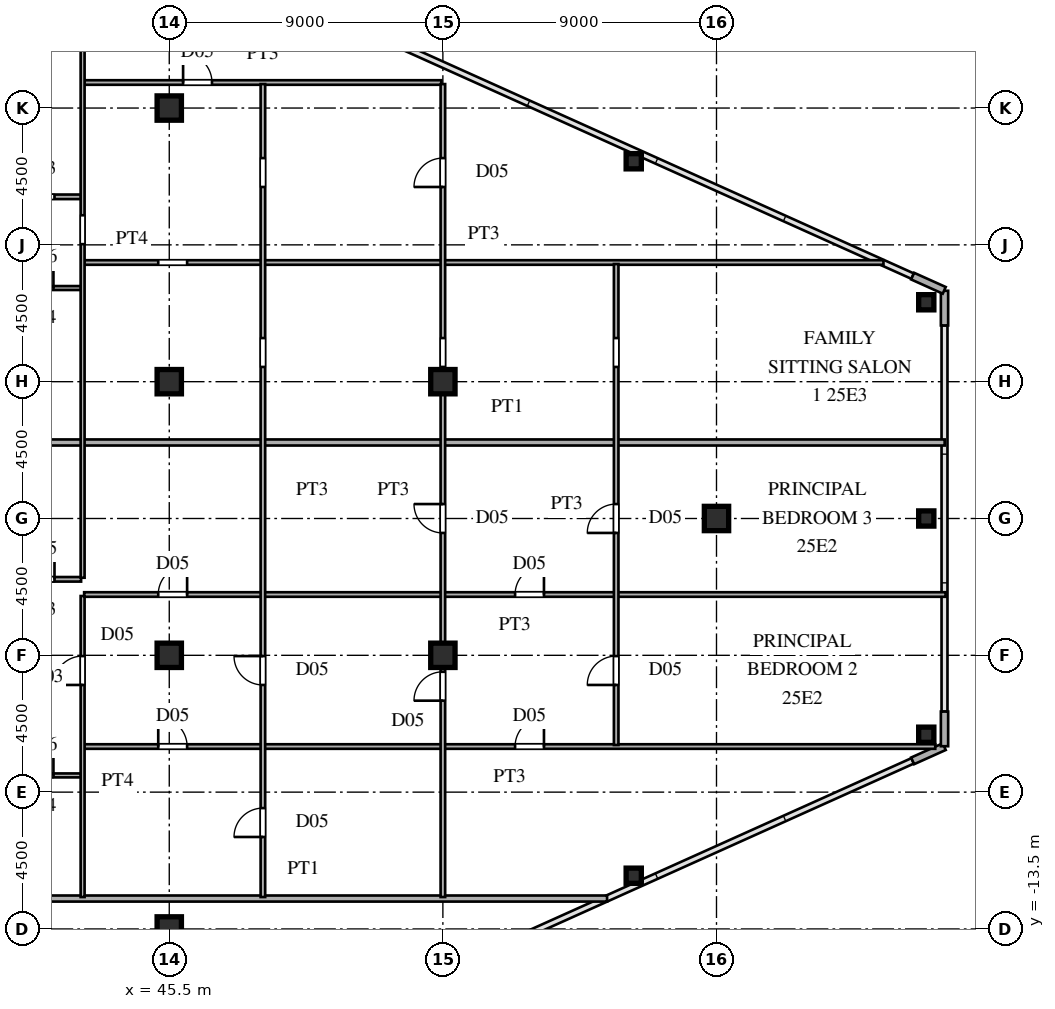
"""IFC4 building model, lengths in metres.
Left out: names, types, materials, properties, quantities, classifications, styles, units other than length and angle.
Written with IfcOpenShell. Run it as: python <this file> out.ifc"""

import sys

from ifc_helpers import new_model, si_unit, direction, frame, frame_2d, origin, origin_2d, place, context, subcontext, project, spatial, rectangle, hollow_rectangle, i_section, extrude, source, transform, mapped, element, fill, save


model = new_model("IFC4")
c1 = context("Model", 3, precision=1e-05, world=origin(), true_north=direction((0.0, 1.0)))
c2 = subcontext(c1, "Body", "Model", "MODEL_VIEW")
j1 = project(units=[si_unit("LENGTHUNIT", "METRE"), si_unit("PLANEANGLEUNIT", "RADIAN")], contexts=[c1])
p1 = place(None, origin())
s1 = spatial("IfcSite", under=j1, at=p1, CompositionType="ELEMENT")
p2 = place(p1, origin())
s2 = spatial("IfcBuilding", under=s1, at=p2, CompositionType="ELEMENT")
p3 = place(p2, frame((0.0, 0.0, 96.0)))
s3 = spatial("IfcBuildingStorey", under=s2, at=p3, CompositionType="ELEMENT", Elevation=96.0)
m1 = source(origin(), c2, "Body", "SweptSolid", [
    extrude(i_section(OverallWidth=0.8, OverallDepth=0.8, WebThickness=0.032, FlangeThickness=0.05, at=origin_2d()), origin(), (0.0, 0.0, 1.0), 3.6),
])
for number, where, z_axis, x_axis in (
    (1, (45.5, -13.5, 0.0), (0.0, 0.0, 1.0), (1.0, 0.0, 0.0)),
    (2, (45.5, -4.5, 0.0), (0.0, 0.0, 1.0), (1.0, 0.0, 0.0)),
    (3, (45.5, 4.5, 0.0), (0.0, 0.0, 1.0), (1.0, 0.0, 0.0)),
    (4, (45.5, 13.5, 0.0), (0.0, 0.0, 1.0), (1.0, 0.0, 0.0)),
    (5, (54.5, -4.5, 0.0), (0.0, 0.0, 1.0), (1.0, 0.0, 0.0)),
    (6, (54.5, 4.5, 0.0), (0.0, 0.0, 1.0), (1.0, 0.0, 0.0)),
    (7, (63.5, 0.0, 0.0), (0.0, 0.0, 1.0), (1.0, 0.0, 0.0)),
):
    element("IfcColumn", number, at=place(p3, frame(where, z_axis=z_axis, x_axis=x_axis)), inside=s3, PredefinedType="COLUMN", context=c2, shape_type="MappedRepresentation", body=[
        mapped(m1, transform((0.0, 0.0, 0.0), scale=1.0)),
    ])
m2 = source(origin(), c2, "Body", "SweptSolid", [
    extrude(hollow_rectangle(XDim=0.5, YDim=0.5, WallThickness=0.02, at=origin_2d()), origin(), (0.0, 0.0, 1.0), 3.6),
])
for number, where, z_axis, x_axis in (
    (8, (70.4, -7.112, 0.0), (0.0, 0.0, 1.0), (1.0, 0.0, 0.0)),
    (9, (70.4, 7.112, 0.0), (0.0, 0.0, 1.0), (1.0, 0.0, 0.0)),
    (10, (60.778, -11.749, 0.0), (0.0, 0.0, 1.0), (1.0, 0.0, 0.0)),
    (11, (60.778, 11.749, 0.0), (0.0, 0.0, 1.0), (1.0, 0.0, 0.0)),
    (12, (70.4, 0.0, 0.0), (0.0, 0.0, 1.0), (1.0, 0.0, 0.0)),
):
    element("IfcColumn", number, at=place(p3, frame(where, z_axis=z_axis, x_axis=x_axis)), inside=s3, PredefinedType="COLUMN", context=c2, shape_type="MappedRepresentation", body=[
        mapped(m2, transform((0.0, 0.0, 0.0), scale=1.0)),
    ])
for number, where, z_axis, x_axis in (
    (13, (69.951, -7.972, 0.0), (0.0, 0.0, 1.0), (0.912, 0.41, 0.0)),
    (14, (71.0, -7.49, 0.0), (0.0, 0.0, 1.0), (0.0, 1.0, 0.0)),
    (15, (71.0, 6.35, 0.0), (0.0, 0.0, 1.0), (0.0, 1.0, 0.0)),
    (16, (70.991, 7.504, 0.0), (0.0, 0.0, 1.0), (-0.912, 0.41, 0.0)),
):
    element("IfcWall", number, at=place(p3, frame(where, z_axis=z_axis, x_axis=x_axis)), inside=s3, PredefinedType="SOLIDWALL", context=c2, shape_type="SweptSolid", body=[
        extrude(rectangle(XDim=1.14, YDim=0.24, at=frame_2d((0.57, 0.0))), origin(), (0.0, 0.0, 1.0), 3.38),
    ])
p4 = place(p3, frame((39.93, -12.5, 0.0), z_axis=(0.0, 0.0, 1.0), x_axis=(1.0, 0.0, 0.0)))
e17 = element("IfcWall", 17, at=p4, inside=s3, PredefinedType="PARTITIONING", context=c2, shape_type="SweptSolid", body=[
    extrude(rectangle(XDim=19.971, YDim=0.2, at=frame_2d((9.985, 0.0))), origin(), (0.0, 0.0, 1.0), 3.38),
])
p5 = place(p3, frame((39.9, -8.45, 0.0), z_axis=(0.0, 0.0, 1.0), x_axis=(1.0, 0.0, 0.0)))
e18 = element("IfcWall", 18, at=p5, inside=s3, PredefinedType="PARTITIONING", context=c2, shape_type="SweptSolid", body=[
    extrude(rectangle(XDim=2.7, YDim=0.13, at=frame_2d((1.35, 0.0))), origin(), (0.0, 0.0, 1.0), 3.38),
])
p6 = place(p5, frame((0.91, 0.0, 0.0)))
e19 = element("IfcOpeningElement", 19, at=p6, cuts=e18, PredefinedType="OPENING", context=c2, shape_type="SweptSolid", body=[
    extrude(rectangle(XDim=0.88, YDim=2.1, at=frame_2d((0.44, 1.05))), frame((0.0, 0.075, 0.0), z_axis=(0.0, -1.0, 0.0), x_axis=(1.0, 0.0, 0.0)), (0.0, 0.0, 1.0), 0.15),
])
p7 = place(p3, frame((42.7, -7.5, 0.0), z_axis=(0.0, 0.0, 1.0), x_axis=(1.0, 0.0, 0.0)))
e20 = element("IfcWall", 20, at=p7, inside=s3, PredefinedType="PARTITIONING", context=c2, shape_type="SweptSolid", body=[
    extrude(rectangle(XDim=27.995, YDim=0.15, at=frame_2d((13.998, 0.0))), origin(), (0.0, 0.0, 1.0), 3.38),
])
p8 = place(p7, frame((2.438, 0.0, 0.0)))
e21 = element("IfcOpeningElement", 21, at=p8, cuts=e20, PredefinedType="OPENING", context=c2, shape_type="SweptSolid", body=[
    extrude(rectangle(XDim=0.95, YDim=2.15, at=frame_2d((0.475, 1.075))), frame((0.0, 0.085, 0.0), z_axis=(0.0, -1.0, 0.0), x_axis=(1.0, 0.0, 0.0)), (0.0, 0.0, 1.0), 0.17),
])
p9 = place(p7, frame((14.175, 0.0, 0.0)))
e22 = element("IfcOpeningElement", 22, at=p9, cuts=e20, PredefinedType="OPENING", context=c2, shape_type="SweptSolid", body=[
    extrude(rectangle(XDim=0.95, YDim=2.15, at=frame_2d((0.475, 1.075))), frame((0.0, 0.085, 0.0), z_axis=(0.0, -1.0, 0.0), x_axis=(1.0, 0.0, 0.0)), (0.0, 0.0, 1.0), 0.17),
])
p10 = place(p3, frame((42.7, -2.5, 0.0), z_axis=(0.0, 0.0, 1.0), x_axis=(1.0, 0.0, 0.0)))
e23 = element("IfcWall", 23, at=p10, inside=s3, PredefinedType="PARTITIONING", context=c2, shape_type="SweptSolid", body=[
    extrude(rectangle(XDim=28.335, YDim=0.15, at=frame_2d((14.167, 0.0))), origin(), (0.0, 0.0, 1.0), 3.38),
])
p11 = place(p10, frame((2.438, 0.0, 0.0)))
e24 = element("IfcOpeningElement", 24, at=p11, cuts=e23, PredefinedType="OPENING", context=c2, shape_type="SweptSolid", body=[
    extrude(rectangle(XDim=0.95, YDim=2.15, at=frame_2d((0.475, 1.075))), frame((0.0, 0.085, 0.0), z_axis=(0.0, -1.0, 0.0), x_axis=(1.0, 0.0, 0.0)), (0.0, 0.0, 1.0), 0.17),
])
p12 = place(p10, frame((14.175, 0.0, 0.0)))
e25 = element("IfcOpeningElement", 25, at=p12, cuts=e23, PredefinedType="OPENING", context=c2, shape_type="SweptSolid", body=[
    extrude(rectangle(XDim=0.95, YDim=2.15, at=frame_2d((0.475, 1.075))), frame((0.0, 0.085, 0.0), z_axis=(0.0, -1.0, 0.0), x_axis=(1.0, 0.0, 0.0)), (0.0, 0.0, 1.0), 0.17),
])
p13 = place(p3, frame((39.9, -2.0, 0.0), z_axis=(0.0, 0.0, 1.0), x_axis=(1.0, 0.0, 0.0)))
e26 = element("IfcWall", 26, at=p13, inside=s3, PredefinedType="PARTITIONING", context=c2, shape_type="SweptSolid", body=[
    extrude(rectangle(XDim=2.7, YDim=0.15, at=frame_2d((1.35, 0.0))), origin(), (0.0, 0.0, 1.0), 3.38),
])
p14 = place(p13, frame((0.875, 0.0, 0.0)))
e27 = element("IfcOpeningElement", 27, at=p14, cuts=e26, PredefinedType="OPENING", context=c2, shape_type="SweptSolid", body=[
    extrude(rectangle(XDim=0.95, YDim=2.15, at=frame_2d((0.475, 1.075))), frame((0.0, 0.085, 0.0), z_axis=(0.0, -1.0, 0.0), x_axis=(1.0, 0.0, 0.0)), (0.0, 0.0, 1.0), 0.17),
])
p15 = place(p3, frame((39.93, 2.5, 0.0), z_axis=(0.0, 0.0, 1.0), x_axis=(1.0, 0.0, 0.0)))
e28 = element("IfcWall", 28, at=p15, inside=s3, PredefinedType="PARTITIONING", context=c2, shape_type="SweptSolid", body=[
    extrude(rectangle(XDim=31.075, YDim=0.2, at=frame_2d((15.538, 0.0))), origin(), (0.0, 0.0, 1.0), 3.38),
])
p16 = place(p3, frame((39.9, 7.58, 0.0), z_axis=(0.0, 0.0, 1.0), x_axis=(1.0, 0.0, 0.0)))
e29 = element("IfcWall", 29, at=p16, inside=s3, PredefinedType="PARTITIONING", context=c2, shape_type="SweptSolid", body=[
    extrude(rectangle(XDim=2.7, YDim=0.13, at=frame_2d((1.35, 0.0))), origin(), (0.0, 0.0, 1.0), 3.38),
])
p17 = place(p16, frame((0.91, 0.0, 0.0)))
e30 = element("IfcOpeningElement", 30, at=p17, cuts=e29, PredefinedType="OPENING", context=c2, shape_type="SweptSolid", body=[
    extrude(rectangle(XDim=0.88, YDim=2.1, at=frame_2d((0.44, 1.05))), frame((0.0, 0.075, 0.0), z_axis=(0.0, -1.0, 0.0), x_axis=(1.0, 0.0, 0.0)), (0.0, 0.0, 1.0), 0.15),
])
p18 = place(p3, frame((42.7, 8.42, 0.0), z_axis=(0.0, 0.0, 1.0), x_axis=(1.0, 0.0, 0.0)))
e31 = element("IfcWall", 31, at=p18, inside=s3, PredefinedType="PARTITIONING", context=c2, shape_type="SweptSolid", body=[
    extrude(rectangle(XDim=26.292, YDim=0.15, at=frame_2d((13.146, 0.0))), origin(), (0.0, 0.0, 1.0), 3.38),
])
p19 = place(p18, frame((2.438, 0.0, 0.0)))
e32 = element("IfcOpeningElement", 32, at=p19, cuts=e31, PredefinedType="OPENING", context=c2, shape_type="SweptSolid", body=[
    extrude(rectangle(XDim=0.95, YDim=2.15, at=frame_2d((0.475, 1.075))), frame((0.0, 0.085, 0.0), z_axis=(0.0, -1.0, 0.0), x_axis=(1.0, 0.0, 0.0)), (0.0, 0.0, 1.0), 0.17),
])
p20 = place(p3, frame((39.9, 10.58, 0.0), z_axis=(0.0, 0.0, 1.0), x_axis=(1.0, 0.0, 0.0)))
e33 = element("IfcWall", 33, at=p20, inside=s3, PredefinedType="PARTITIONING", context=c2, shape_type="SweptSolid", body=[
    extrude(rectangle(XDim=2.7, YDim=0.15, at=frame_2d((1.35, 0.0))), origin(), (0.0, 0.0, 1.0), 3.38),
])
p21 = place(p20, frame((0.875, 0.0, 0.0)))
e34 = element("IfcOpeningElement", 34, at=p21, cuts=e33, PredefinedType="OPENING", context=c2, shape_type="SweptSolid", body=[
    extrude(rectangle(XDim=0.95, YDim=2.15, at=frame_2d((0.475, 1.075))), frame((0.0, 0.085, 0.0), z_axis=(0.0, -1.0, 0.0), x_axis=(1.0, 0.0, 0.0)), (0.0, 0.0, 1.0), 0.17),
])
p22 = place(p3, frame((42.7, 14.34, 0.0), z_axis=(0.0, 0.0, 1.0), x_axis=(1.0, 0.0, 0.0)))
e35 = element("IfcWall", 35, at=p22, inside=s3, PredefinedType="PARTITIONING", context=c2, shape_type="SweptSolid", body=[
    extrude(rectangle(XDim=11.75, YDim=0.15, at=frame_2d((5.875, 0.0))), origin(), (0.0, 0.0, 1.0), 3.38),
])
p23 = place(p22, frame((3.255, 0.0, 0.0)))
e36 = element("IfcOpeningElement", 36, at=p23, cuts=e35, PredefinedType="OPENING", context=c2, shape_type="SweptSolid", body=[
    extrude(rectangle(XDim=0.95, YDim=2.15, at=frame_2d((0.475, 1.075))), frame((0.0, 0.085, 0.0), z_axis=(0.0, -1.0, 0.0), x_axis=(1.0, 0.0, 0.0)), (0.0, 0.0, 1.0), 0.17),
])
p24 = place(p3, frame((42.65, -12.45, 0.0), z_axis=(0.0, 0.0, 1.0), x_axis=(0.0, 1.0, 0.0)))
e37 = element("IfcWall", 37, at=p24, inside=s3, PredefinedType="PARTITIONING", context=c2, shape_type="SweptSolid", body=[
    extrude(rectangle(XDim=9.9, YDim=0.13, at=frame_2d((4.95, 0.0))), origin(), (0.0, 0.0, 1.0), 3.38),
])
p25 = place(p24, frame((6.975, 0.0, 0.0)))
e38 = element("IfcOpeningElement", 38, at=p25, cuts=e37, PredefinedType="OPENING", context=c2, shape_type="SweptSolid", body=[
    extrude(rectangle(XDim=0.95, YDim=2.15, at=frame_2d((0.475, 1.075))), frame((0.0, 0.075, 0.0), z_axis=(0.0, -1.0, 0.0), x_axis=(1.0, 0.0, 0.0)), (0.0, 0.0, 1.0), 0.15),
])
p26 = place(p3, frame((42.65, -1.948, 0.0), z_axis=(0.0, 0.0, 1.0), x_axis=(0.0, 1.0, 0.0)))
e39 = element("IfcWall", 39, at=p26, inside=s3, PredefinedType="PARTITIONING", context=c2, shape_type="SweptSolid", body=[
    extrude(rectangle(XDim=22.241, YDim=0.13, at=frame_2d((11.121, 0.0))), origin(), (0.0, 0.0, 1.0), 3.38),
])
p27 = place(p26, frame((10.971, 0.0, 0.0)))
e40 = element("IfcOpeningElement", 40, at=p27, cuts=e39, PredefinedType="OPENING", context=c2, shape_type="SweptSolid", body=[
    extrude(rectangle(XDim=0.95, YDim=2.15, at=frame_2d((0.475, 1.075))), frame((0.0, 0.075, 0.0), z_axis=(0.0, -1.0, 0.0), x_axis=(1.0, 0.0, 0.0)), (0.0, 0.0, 1.0), 0.15),
])
p28 = place(p3, frame((48.58, -12.45, 0.0), z_axis=(0.0, 0.0, 1.0), x_axis=(0.0, 1.0, 0.0)))
e41 = element("IfcWall", 41, at=p28, inside=s3, PredefinedType="PARTITIONING", context=c2, shape_type="SweptSolid", body=[
    extrude(rectangle(XDim=26.738, YDim=0.15, at=frame_2d((13.369, 0.0))), origin(), (0.0, 0.0, 1.0), 3.38),
])
p29 = place(p28, frame((6.975, 0.0, 0.0)))
e42 = element("IfcOpeningElement", 42, at=p29, cuts=e41, PredefinedType="OPENING", context=c2, shape_type="SweptSolid", body=[
    extrude(rectangle(XDim=0.95, YDim=2.15, at=frame_2d((0.475, 1.075))), frame((0.0, 0.085, 0.0), z_axis=(0.0, -1.0, 0.0), x_axis=(1.0, 0.0, 0.0)), (0.0, 0.0, 1.0), 0.17),
])
p30 = place(p28, frame((1.975, 0.0, 0.0)))
e43 = element("IfcOpeningElement", 43, at=p30, cuts=e41, PredefinedType="OPENING", context=c2, shape_type="SweptSolid", body=[
    extrude(rectangle(XDim=0.95, YDim=2.15, at=frame_2d((0.475, 1.075))), frame((0.0, 0.085, 0.0), z_axis=(0.0, -1.0, 0.0), x_axis=(1.0, 0.0, 0.0)), (0.0, 0.0, 1.0), 0.17),
])
p31 = place(p28, frame((23.354, 0.0, 0.0)))
e44 = element("IfcOpeningElement", 44, at=p31, cuts=e41, PredefinedType="OPENING", context=c2, shape_type="SweptSolid", body=[
    extrude(rectangle(XDim=0.95, YDim=2.15, at=frame_2d((0.475, 1.075))), frame((0.0, 0.085, 0.0), z_axis=(0.0, -1.0, 0.0), x_axis=(1.0, 0.0, 0.0)), (0.0, 0.0, 1.0), 0.17),
])
p32 = place(p28, frame((17.435, 0.0, 0.0)))
e45 = element("IfcOpeningElement", 45, at=p32, cuts=e41, PredefinedType="OPENING", context=c2, shape_type="SweptSolid", body=[
    extrude(rectangle(XDim=0.95, YDim=2.15, at=frame_2d((0.475, 1.075))), frame((0.0, 0.085, 0.0), z_axis=(0.0, -1.0, 0.0), x_axis=(1.0, 0.0, 0.0)), (0.0, 0.0, 1.0), 0.17),
])
p33 = place(p3, frame((54.5, -12.45, 0.0), z_axis=(0.0, 0.0, 1.0), x_axis=(0.0, 1.0, 0.0)))
e46 = element("IfcWall", 46, at=p33, inside=s3, PredefinedType="PARTITIONING", context=c2, shape_type="SweptSolid", body=[
    extrude(rectangle(XDim=26.738, YDim=0.15, at=frame_2d((13.369, 0.0))), origin(), (0.0, 0.0, 1.0), 2.68),
])
p34 = place(p33, frame((6.458, 0.0, 0.0)))
e47 = element("IfcOpeningElement", 47, at=p34, cuts=e46, PredefinedType="OPENING", context=c2, shape_type="SweptSolid", body=[
    extrude(rectangle(XDim=0.95, YDim=2.15, at=frame_2d((0.475, 1.075))), frame((0.0, 0.085, 0.0), z_axis=(0.0, -1.0, 0.0), x_axis=(1.0, 0.0, 0.0)), (0.0, 0.0, 1.0), 0.17),
])
p35 = place(p33, frame((11.975, 0.0, 0.0)))
e48 = element("IfcOpeningElement", 48, at=p35, cuts=e46, PredefinedType="OPENING", context=c2, shape_type="SweptSolid", body=[
    extrude(rectangle(XDim=0.95, YDim=2.15, at=frame_2d((0.475, 1.075))), frame((0.0, 0.085, 0.0), z_axis=(0.0, -1.0, 0.0), x_axis=(1.0, 0.0, 0.0)), (0.0, 0.0, 1.0), 0.17),
])
p36 = place(p33, frame((23.354, 0.0, 0.0)))
e49 = element("IfcOpeningElement", 49, at=p36, cuts=e46, PredefinedType="OPENING", context=c2, shape_type="SweptSolid", body=[
    extrude(rectangle(XDim=0.95, YDim=2.15, at=frame_2d((0.475, 1.075))), frame((0.0, 0.085, 0.0), z_axis=(0.0, -1.0, 0.0), x_axis=(1.0, 0.0, 0.0)), (0.0, 0.0, 1.0), 0.17),
])
p37 = place(p33, frame((17.435, 0.0, 0.0)))
e50 = element("IfcOpeningElement", 50, at=p37, cuts=e46, PredefinedType="OPENING", context=c2, shape_type="SweptSolid", body=[
    extrude(rectangle(XDim=0.95, YDim=2.15, at=frame_2d((0.475, 1.075))), frame((0.0, 0.085, 0.0), z_axis=(0.0, -1.0, 0.0), x_axis=(1.0, 0.0, 0.0)), (0.0, 0.0, 1.0), 0.17),
])
p38 = place(p3, frame((60.2, -7.45, 0.0), z_axis=(0.0, 0.0, 1.0), x_axis=(0.0, 1.0, 0.0)))
e51 = element("IfcWall", 51, at=p38, inside=s3, PredefinedType="PARTITIONING", context=c2, shape_type="SweptSolid", body=[
    extrude(rectangle(XDim=15.819, YDim=0.15, at=frame_2d((7.909, 0.0))), origin(), (0.0, 0.0, 1.0), 3.38),
])
p39 = place(p38, frame((1.975, 0.0, 0.0)))
e52 = element("IfcOpeningElement", 52, at=p39, cuts=e51, PredefinedType="OPENING", context=c2, shape_type="SweptSolid", body=[
    extrude(rectangle(XDim=0.95, YDim=2.15, at=frame_2d((0.475, 1.075))), frame((0.0, 0.085, 0.0), z_axis=(0.0, -1.0, 0.0), x_axis=(1.0, 0.0, 0.0)), (0.0, 0.0, 1.0), 0.17),
])
p40 = place(p38, frame((6.975, 0.0, 0.0)))
e53 = element("IfcOpeningElement", 53, at=p40, cuts=e51, PredefinedType="OPENING", context=c2, shape_type="SweptSolid", body=[
    extrude(rectangle(XDim=0.95, YDim=2.15, at=frame_2d((0.475, 1.075))), frame((0.0, 0.085, 0.0), z_axis=(0.0, -1.0, 0.0), x_axis=(1.0, 0.0, 0.0)), (0.0, 0.0, 1.0), 0.17),
])
p41 = place(p38, frame((12.435, 0.0, 0.0)))
e54 = element("IfcOpeningElement", 54, at=p41, cuts=e51, PredefinedType="OPENING", context=c2, shape_type="SweptSolid", body=[
    extrude(rectangle(XDim=0.95, YDim=2.15, at=frame_2d((0.475, 1.075))), frame((0.0, 0.085, 0.0), z_axis=(0.0, -1.0, 0.0), x_axis=(1.0, 0.0, 0.0)), (0.0, 0.0, 1.0), 0.17),
])
m3 = source(origin(), c2, "Body", "SweptSolid", [
    extrude(rectangle(XDim=0.88, YDim=2.1, at=frame_2d((0.44, 1.05))), frame((0.0, 0.025, 0.0), z_axis=(0.0, -1.0, 0.0), x_axis=(1.0, 0.0, 0.0)), (0.0, 0.0, 1.0), 0.05),
])
p42 = place(p6, origin())
e55 = element("IfcDoor", 55, at=p42, inside=s3, OperationType="SINGLE_SWING_RIGHT", PredefinedType="DOOR", context=c2, shape_type="MappedRepresentation", body=[
    mapped(m3, transform((0.0, 0.0, 0.0), scale=1.0)),
])
fill(e19, e55)
m4 = source(origin(), c2, "Body", "SweptSolid", [
    extrude(rectangle(XDim=0.95, YDim=2.15, at=frame_2d((0.475, 1.075))), frame((0.0, 0.025, 0.0), z_axis=(0.0, -1.0, 0.0), x_axis=(1.0, 0.0, 0.0)), (0.0, 0.0, 1.0), 0.05),
])
p43 = place(p8, origin())
e56 = element("IfcDoor", 56, at=p43, inside=s3, OperationType="SINGLE_SWING_LEFT", PredefinedType="DOOR", context=c2, shape_type="MappedRepresentation", body=[
    mapped(m4, transform((0.0, 0.0, 0.0), scale=1.0)),
])
fill(e21, e56)
p44 = place(p9, origin())
e57 = element("IfcDoor", 57, at=p44, inside=s3, OperationType="SINGLE_SWING_RIGHT", PredefinedType="DOOR", context=c2, shape_type="MappedRepresentation", body=[
    mapped(m4, transform((0.0, 0.0, 0.0), scale=1.0)),
])
fill(e22, e57)
p45 = place(p11, origin())
e58 = element("IfcDoor", 58, at=p45, inside=s3, OperationType="SINGLE_SWING_RIGHT", PredefinedType="DOOR", context=c2, shape_type="MappedRepresentation", body=[
    mapped(m4, transform((0.0, 0.0, 0.0), scale=1.0)),
])
fill(e24, e58)
p46 = place(p12, origin())
e59 = element("IfcDoor", 59, at=p46, inside=s3, OperationType="SINGLE_SWING_RIGHT", PredefinedType="DOOR", context=c2, shape_type="MappedRepresentation", body=[
    mapped(m4, transform((0.0, 0.0, 0.0), scale=1.0)),
])
fill(e25, e59)
p47 = place(p14, origin())
e60 = element("IfcDoor", 60, at=p47, inside=s3, OperationType="SINGLE_SWING_RIGHT", PredefinedType="DOOR", context=c2, shape_type="MappedRepresentation", body=[
    mapped(m4, transform((0.0, 0.0, 0.0), scale=1.0)),
])
fill(e27, e60)
p48 = place(p17, origin())
e61 = element("IfcDoor", 61, at=p48, inside=s3, OperationType="SINGLE_SWING_RIGHT", PredefinedType="DOOR", context=c2, shape_type="MappedRepresentation", body=[
    mapped(m3, transform((0.0, 0.0, 0.0), scale=1.0)),
])
fill(e30, e61)
p49 = place(p23, origin())
e62 = element("IfcDoor", 62, at=p49, inside=s3, OperationType="SINGLE_SWING_LEFT", PredefinedType="DOOR", context=c2, shape_type="MappedRepresentation", body=[
    mapped(m4, transform((0.0, 0.0, 0.0), scale=1.0)),
])
fill(e36, e62)
p50 = place(p25, origin())
e63 = element("IfcDoor", 63, at=p50, inside=s3, OperationType="SINGLE_SWING_LEFT", PredefinedType="DOOR", context=c2, shape_type="MappedRepresentation", body=[
    mapped(m4, transform((0.0, 0.0, 0.0), scale=1.0)),
])
fill(e38, e63)
p51 = place(p29, origin())
e64 = element("IfcDoor", 64, at=p51, inside=s3, OperationType="SINGLE_SWING_RIGHT", PredefinedType="DOOR", context=c2, shape_type="MappedRepresentation", body=[
    mapped(m4, transform((0.0, 0.0, 0.0), scale=1.0)),
])
fill(e42, e64)
p52 = place(p30, origin())
e65 = element("IfcDoor", 65, at=p52, inside=s3, OperationType="SINGLE_SWING_LEFT", PredefinedType="DOOR", context=c2, shape_type="MappedRepresentation", body=[
    mapped(m4, transform((0.0, 0.0, 0.0), scale=1.0)),
])
fill(e43, e65)
p53 = place(p34, origin())
e66 = element("IfcDoor", 66, at=p53, inside=s3, OperationType="SINGLE_SWING_LEFT", PredefinedType="DOOR", context=c2, shape_type="MappedRepresentation", body=[
    mapped(m4, transform((0.0, 0.0, 0.0), scale=1.0)),
])
fill(e47, e66)
p54 = place(p35, origin())
e67 = element("IfcDoor", 67, at=p54, inside=s3, OperationType="SINGLE_SWING_RIGHT", PredefinedType="DOOR", context=c2, shape_type="MappedRepresentation", body=[
    mapped(m4, transform((0.0, 0.0, 0.0), scale=1.0)),
])
fill(e48, e67)
p55 = place(p36, origin())
e68 = element("IfcDoor", 68, at=p55, inside=s3, OperationType="SINGLE_SWING_LEFT", PredefinedType="DOOR", context=c2, shape_type="MappedRepresentation", body=[
    mapped(m4, transform((0.0, 0.0, 0.0), scale=1.0)),
])
fill(e49, e68)
p56 = place(p39, origin())
e69 = element("IfcDoor", 69, at=p56, inside=s3, OperationType="SINGLE_SWING_LEFT", PredefinedType="DOOR", context=c2, shape_type="MappedRepresentation", body=[
    mapped(m4, transform((0.0, 0.0, 0.0), scale=1.0)),
])
fill(e52, e69)
p57 = place(p40, origin())
e70 = element("IfcDoor", 70, at=p57, inside=s3, OperationType="SINGLE_SWING_LEFT", PredefinedType="DOOR", context=c2, shape_type="MappedRepresentation", body=[
    mapped(m4, transform((0.0, 0.0, 0.0), scale=1.0)),
])
fill(e53, e70)
save(model, sys.argv[1])
